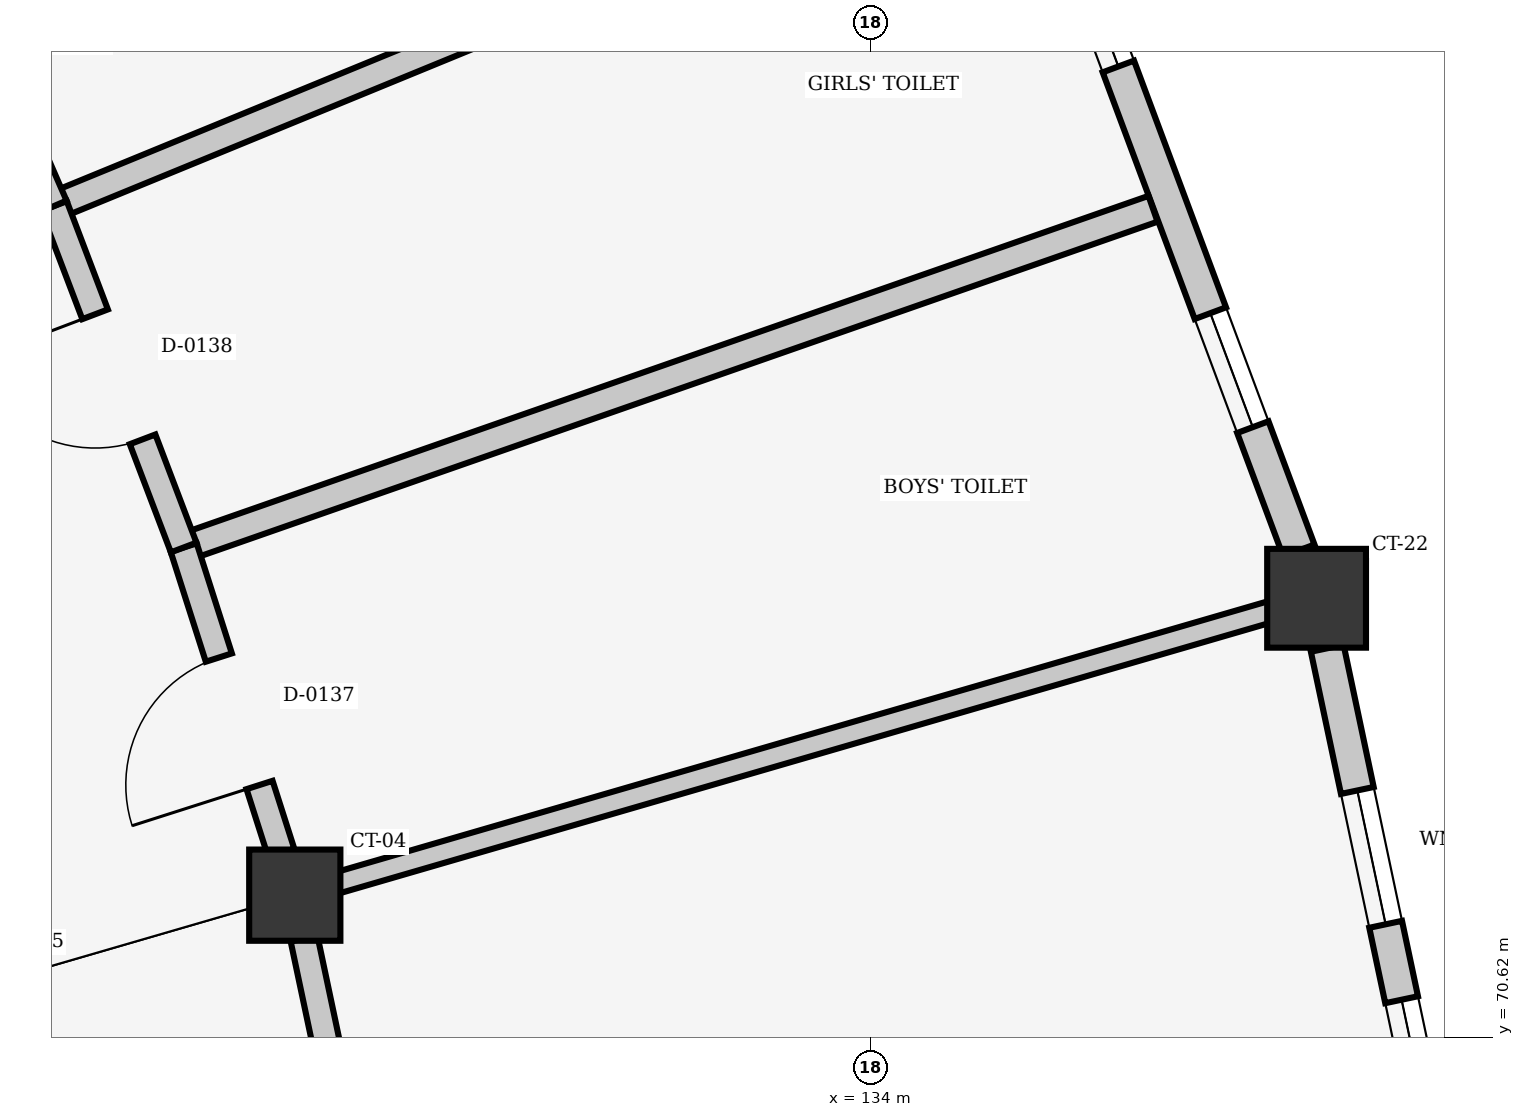
"""IFC4 building model, lengths in metres.
Left out: names, types, materials, properties, quantities, classifications, styles, units other than length and angle.
Written with IfcOpenShell. Run it as: python <this file> out.ifc"""

import sys

from ifc_helpers import new_model, si_unit, direction, frame, frame_2d, origin, origin_2d, place, context, subcontext, project, spatial, rectangle, extrude, element, fill, save


model = new_model("IFC4")
c1 = context("Model", 3, precision=1e-05, world=origin(), true_north=direction((0.0, 1.0)))
c2 = subcontext(c1, "Body", "Model", "MODEL_VIEW")
j1 = project(units=[si_unit("LENGTHUNIT", "METRE"), si_unit("PLANEANGLEUNIT", "RADIAN")], contexts=[c1])
p1 = place(None, origin())
s1 = spatial("IfcSite", under=j1, at=p1, CompositionType="ELEMENT")
p2 = place(p1, origin())
s2 = spatial("IfcBuilding", under=s1, at=p2, CompositionType="ELEMENT")
p3 = place(p2, origin())
s3 = spatial("IfcBuildingStorey", under=s2, at=p3, CompositionType="ELEMENT", Elevation=0.0)
p4 = place(p3, frame((130.213, 71.555, 0.0), z_axis=(0.0, 0.0, 1.0), x_axis=(0.960293685677, 0.278991106039, 0.0)))
e1 = element("IfcColumn", 1, at=p4, inside=s3, PredefinedType="COLUMN", context=c2, shape_type="SweptSolid", body=[
    extrude(rectangle(XDim=0.6, YDim=0.6, at=origin_2d()), origin(), (0.0, 0.0, 1.0), 4.5),
])
p5 = place(p3, frame((136.935, 73.508, 0.0), z_axis=(0.0, 0.0, 1.0), x_axis=(0.960293685677, 0.278991106039, 0.0)))
e2 = element("IfcColumn", 2, at=p5, inside=s3, PredefinedType="COLUMN", context=c2, shape_type="SweptSolid", body=[
    extrude(rectangle(XDim=0.65, YDim=0.65, at=origin_2d()), origin(), (0.0, 0.0, 1.0), 4.5),
])
p6 = place(p3, frame((137.005, 73.179, 0.0), z_axis=(0.0, 0.0, 1.0), x_axis=(0.207081302077, -0.978323736976, 0.0)))
e3 = element("IfcWall", 3, at=p6, inside=s3, PredefinedType="SOLIDWALL", context=c2, shape_type="SweptSolid", body=[
    extrude(rectangle(XDim=7.031, YDim=0.22, at=frame_2d((3.516, 0.0))), origin(), (0.0, 0.0, 1.0), 3.55),
])
p7 = place(p6, frame((0.956, 0.0, 0.85)))
e4 = element("IfcOpeningElement", 4, at=p7, cuts=e3, PredefinedType="OPENING", context=c2, shape_type="SweptSolid", body=[
    extrude(rectangle(XDim=0.9, YDim=1.4, at=frame_2d((0.45, 0.7))), frame((0.0, 0.12, 0.0), z_axis=(0.0, -1.0, 0.0), x_axis=(1.0, 0.0, 0.0)), (0.0, 0.0, 1.0), 0.24),
])
p8 = place(p6, frame((2.363, 0.0, 0.85)))
e5 = element("IfcOpeningElement", 5, at=p8, cuts=e3, PredefinedType="OPENING", context=c2, shape_type="SweptSolid", body=[
    extrude(rectangle(XDim=0.9, YDim=1.4, at=frame_2d((0.45, 0.7))), frame((0.0, 0.12, 0.0), z_axis=(0.0, -1.0, 0.0), x_axis=(1.0, 0.0, 0.0)), (0.0, 0.0, 1.0), 0.24),
])
p9 = place(p6, frame((3.769, 0.0, 0.85)))
e6 = element("IfcOpeningElement", 6, at=p9, cuts=e3, PredefinedType="OPENING", context=c2, shape_type="SweptSolid", body=[
    extrude(rectangle(XDim=0.9, YDim=1.4, at=frame_2d((0.45, 0.7))), frame((0.0, 0.12, 0.0), z_axis=(0.0, -1.0, 0.0), x_axis=(1.0, 0.0, 0.0)), (0.0, 0.0, 1.0), 0.24),
])
p10 = place(p6, frame((5.175, 0.0, 0.85)))
e7 = element("IfcOpeningElement", 7, at=p10, cuts=e3, PredefinedType="OPENING", context=c2, shape_type="SweptSolid", body=[
    extrude(rectangle(XDim=0.9, YDim=1.4, at=frame_2d((0.45, 0.7))), frame((0.0, 0.12, 0.0), z_axis=(0.0, -1.0, 0.0), x_axis=(1.0, 0.0, 0.0)), (0.0, 0.0, 1.0), 0.24),
])
p11 = place(p3, frame((134.361, 80.411, 0.0), z_axis=(0.0, 0.0, 1.0), x_axis=(0.349448583385, -0.936955541939, 0.0)))
e8 = element("IfcWall", 8, at=p11, inside=s3, PredefinedType="SOLIDWALL", context=c2, shape_type="SweptSolid", body=[
    extrude(rectangle(XDim=7.031, YDim=0.22, at=frame_2d((3.516, 0.0))), origin(), (0.0, 0.0, 1.0), 3.55),
])
p12 = place(p11, frame((0.584, 0.0, 1.15)))
e9 = element("IfcOpeningElement", 9, at=p12, cuts=e8, PredefinedType="OPENING", context=c2, shape_type="SweptSolid", body=[
    extrude(rectangle(XDim=0.8, YDim=1.1, at=frame_2d((0.4, 0.55))), frame((0.0, 0.12, 0.0), z_axis=(0.0, -1.0, 0.0), x_axis=(1.0, 0.0, 0.0)), (0.0, 0.0, 1.0), 0.24),
])
p13 = place(p11, frame((2.834, 0.0, 1.15)))
e10 = element("IfcOpeningElement", 10, at=p13, cuts=e8, PredefinedType="OPENING", context=c2, shape_type="SweptSolid", body=[
    extrude(rectangle(XDim=0.8, YDim=1.1, at=frame_2d((0.4, 0.55))), frame((0.0, 0.12, 0.0), z_axis=(0.0, -1.0, 0.0), x_axis=(1.0, 0.0, 0.0)), (0.0, 0.0, 1.0), 0.24),
])
p14 = place(p11, frame((5.366, 0.0, 1.15)))
e11 = element("IfcOpeningElement", 11, at=p14, cuts=e8, PredefinedType="OPENING", context=c2, shape_type="SweptSolid", body=[
    extrude(rectangle(XDim=0.8, YDim=1.1, at=frame_2d((0.4, 0.55))), frame((0.0, 0.12, 0.0), z_axis=(0.0, -1.0, 0.0), x_axis=(1.0, 0.0, 0.0)), (0.0, 0.0, 1.0), 0.24),
])
p15 = place(p3, frame((130.493, 71.636, 0.0), z_axis=(0.0, 0.0, 1.0), x_axis=(0.960267345013, 0.279081755231, 0.0)))
e12 = element("IfcWall", 12, at=p15, inside=s3, PredefinedType="PARTITIONING", context=c2, shape_type="SweptSolid", body=[
    extrude(rectangle(XDim=6.392, YDim=0.14, at=frame_2d((3.196, 0.0))), origin(), (0.0, 0.0, 1.0), 3.572),
])
p16 = place(p3, frame((129.482, 73.842, 0.0), z_axis=(0.0, 0.0, 1.0), x_axis=(0.944038525113, 0.329835205979, 0.0)))
e13 = element("IfcWall", 13, at=p16, inside=s3, PredefinedType="PARTITIONING", context=c2, shape_type="SweptSolid", body=[
    extrude(rectangle(XDim=6.755, YDim=0.18, at=frame_2d((3.377, 0.0))), origin(), (0.0, 0.0, 1.0), 3.572),
])
p17 = place(p3, frame((128.629, 76.088, 0.0), z_axis=(0.0, 0.0, 1.0), x_axis=(0.925130635841, 0.379648925494, 0.0)))
e14 = element("IfcWall", 14, at=p17, inside=s3, PredefinedType="PARTITIONING", context=c2, shape_type="SweptSolid", body=[
    extrude(rectangle(XDim=6.772, YDim=0.18, at=frame_2d((3.386, 0.0))), origin(), (0.0, 0.0, 1.0), 3.572),
])
p18 = place(p3, frame((131.533, 65.318, 0.0), z_axis=(0.0, 0.0, 1.0), x_axis=(-0.206987404473, 0.978343607527, 0.0)))
e15 = element("IfcWall", 15, at=p18, inside=s3, PredefinedType="PARTITIONING", context=c2, shape_type="SweptSolid", body=[
    extrude(rectangle(XDim=6.083, YDim=0.18, at=frame_2d((3.042, 0.0))), origin(), (0.0, 0.0, 1.0), 3.572),
])
p19 = place(p18, frame((2.601, 0.0, 0.0)))
e16 = element("IfcOpeningElement", 16, at=p19, cuts=e15, PredefinedType="OPENING", context=c2, shape_type="SweptSolid", body=[
    extrude(rectangle(XDim=0.88, YDim=2.1, at=frame_2d((0.44, 1.05))), frame((0.0, 0.1, 0.0), z_axis=(0.0, -1.0, 0.0), x_axis=(1.0, 0.0, 0.0)), (0.0, 0.0, 1.0), 0.2),
])
p20 = place(p3, frame((130.124, 71.833, 0.0), z_axis=(0.0, 0.0, 1.0), x_axis=(-0.304431303169, 0.952534294212, 0.0)))
e17 = element("IfcWall", 17, at=p20, inside=s3, PredefinedType="PARTITIONING", context=c2, shape_type="SweptSolid", body=[
    extrude(rectangle(XDim=2.109, YDim=0.18, at=frame_2d((1.055, 0.0))), origin(), (0.0, 0.0, 1.0), 3.572),
])
p21 = place(p20, frame((0.469, 0.0, 0.0)))
e18 = element("IfcOpeningElement", 18, at=p21, cuts=e17, PredefinedType="OPENING", context=c2, shape_type="SweptSolid", body=[
    extrude(rectangle(XDim=0.88, YDim=2.1, at=frame_2d((0.44, 1.05))), frame((0.0, 0.1, 0.0), z_axis=(0.0, -1.0, 0.0), x_axis=(1.0, 0.0, 0.0)), (0.0, 0.0, 1.0), 0.2),
])
p22 = place(p3, frame((129.482, 73.842, 0.0), z_axis=(0.0, 0.0, 1.0), x_axis=(-0.35507389875, 0.934838235432, 0.0)))
e19 = element("IfcWall", 19, at=p22, inside=s3, PredefinedType="PARTITIONING", context=c2, shape_type="SweptSolid", body=[
    extrude(rectangle(XDim=2.402, YDim=0.18, at=frame_2d((1.201, 0.0))), origin(), (0.0, 0.0, 1.0), 3.572),
])
p23 = place(p22, frame((0.761, 0.0, 0.0)))
e20 = element("IfcOpeningElement", 20, at=p23, cuts=e19, PredefinedType="OPENING", context=c2, shape_type="SweptSolid", body=[
    extrude(rectangle(XDim=0.88, YDim=2.1, at=frame_2d((0.44, 1.05))), frame((0.0, 0.1, 0.0), z_axis=(0.0, -1.0, 0.0), x_axis=(1.0, 0.0, 0.0)), (0.0, 0.0, 1.0), 0.2),
])
p24 = place(p3, frame((128.629, 76.088, 0.0), z_axis=(0.0, 0.0, 1.0), x_axis=(-0.399054628418, 0.916927152798, 0.0)))
e21 = element("IfcWall", 21, at=p24, inside=s3, PredefinedType="PARTITIONING", context=c2, shape_type="SweptSolid", body=[
    extrude(rectangle(XDim=1.576, YDim=0.18, at=frame_2d((0.788, 0.0))), origin(), (0.0, 0.0, 1.0), 3.572),
])
p25 = place(p24, frame((0.494, 0.0, 0.0)))
e22 = element("IfcOpeningElement", 22, at=p25, cuts=e21, PredefinedType="OPENING", context=c2, shape_type="SweptSolid", body=[
    extrude(rectangle(XDim=0.88, YDim=2.1, at=frame_2d((0.44, 1.05))), frame((0.0, 0.1, 0.0), z_axis=(0.0, -1.0, 0.0), x_axis=(1.0, 0.0, 0.0)), (0.0, 0.0, 1.0), 0.2),
])
p26 = place(p7, origin())
e23 = element("IfcWindow", 23, at=p26, inside=s3, PartitioningType="SINGLE_PANEL", PredefinedType="WINDOW", context=c2, shape_type="SweptSolid", body=[
    extrude(rectangle(XDim=0.9, YDim=1.4, at=frame_2d((0.45, 0.7))), frame((0.0, 0.03, 0.0), z_axis=(0.0, -1.0, 0.0), x_axis=(1.0, 0.0, 0.0)), (0.0, 0.0, 1.0), 0.06),
])
fill(e4, e23)
p27 = place(p8, origin())
e24 = element("IfcWindow", 24, at=p27, inside=s3, PartitioningType="SINGLE_PANEL", PredefinedType="WINDOW", context=c2, shape_type="SweptSolid", body=[
    extrude(rectangle(XDim=0.9, YDim=1.4, at=frame_2d((0.45, 0.7))), frame((0.0, 0.03, 0.0), z_axis=(0.0, -1.0, 0.0), x_axis=(1.0, 0.0, 0.0)), (0.0, 0.0, 1.0), 0.06),
])
fill(e5, e24)
p28 = place(p13, origin())
e25 = element("IfcWindow", 25, at=p28, inside=s3, PartitioningType="SINGLE_PANEL", PredefinedType="WINDOW", context=c2, shape_type="SweptSolid", body=[
    extrude(rectangle(XDim=0.8, YDim=1.1, at=frame_2d((0.4, 0.55))), frame((0.0, 0.03, 0.0), z_axis=(0.0, -1.0, 0.0), x_axis=(1.0, 0.0, 0.0)), (0.0, 0.0, 1.0), 0.06),
])
fill(e10, e25)
p29 = place(p14, origin())
e26 = element("IfcWindow", 26, at=p29, inside=s3, PartitioningType="SINGLE_PANEL", PredefinedType="WINDOW", context=c2, shape_type="SweptSolid", body=[
    extrude(rectangle(XDim=0.8, YDim=1.1, at=frame_2d((0.4, 0.55))), frame((0.0, 0.03, 0.0), z_axis=(0.0, -1.0, 0.0), x_axis=(1.0, 0.0, 0.0)), (0.0, 0.0, 1.0), 0.06),
])
fill(e11, e26)
p30 = place(p21, origin())
e27 = element("IfcDoor", 27, at=p30, inside=s3, OperationType="SINGLE_SWING_LEFT", PredefinedType="DOOR", context=c2, shape_type="SweptSolid", body=[
    extrude(rectangle(XDim=0.88, YDim=2.1, at=frame_2d((0.44, 1.05))), frame((0.0, 0.025, 0.0), z_axis=(0.0, -1.0, 0.0), x_axis=(1.0, 0.0, 0.0)), (0.0, 0.0, 1.0), 0.05),
])
fill(e18, e27)
p31 = place(p23, origin())
e28 = element("IfcDoor", 28, at=p31, inside=s3, OperationType="SINGLE_SWING_RIGHT", PredefinedType="DOOR", context=c2, shape_type="SweptSolid", body=[
    extrude(rectangle(XDim=0.88, YDim=2.1, at=frame_2d((0.44, 1.05))), frame((0.0, 0.025, 0.0), z_axis=(0.0, -1.0, 0.0), x_axis=(1.0, 0.0, 0.0)), (0.0, 0.0, 1.0), 0.05),
])
fill(e20, e28)
save(model, sys.argv[1])
